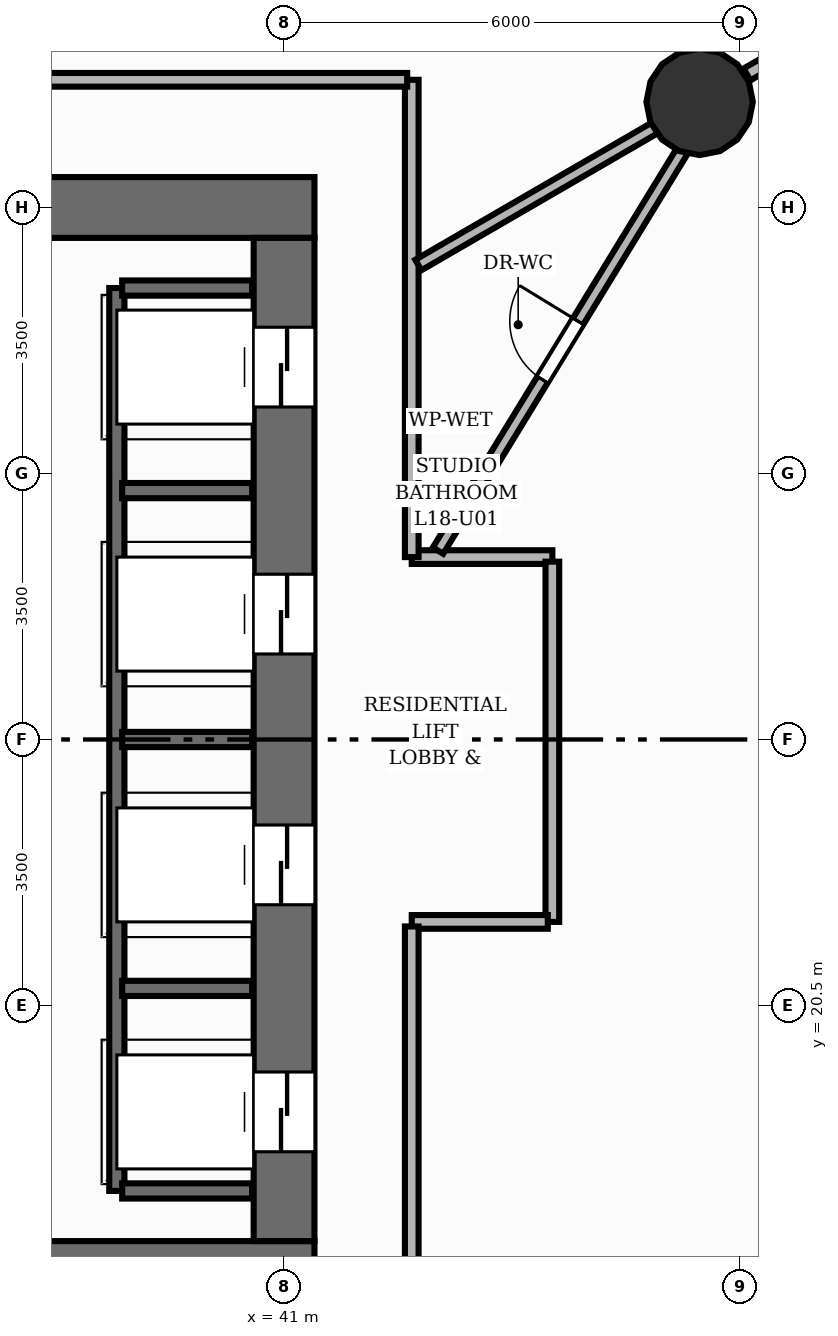
"""IFC4 building model, lengths in metres.
Left out: names, types, materials, properties, quantities, classifications, styles, units other than length and angle.
Written with IfcOpenShell. Run it as: python <this file> out.ifc"""

import sys

from ifc_helpers import new_model, si_unit, direction, frame, frame_2d, origin, origin_2d, place, context, subcontext, project, spatial, rectangle, circle, extrude, element, fill, save


model = new_model("IFC4")
c1 = context("Model", 3, precision=1e-05, world=origin(), true_north=direction((0.0, 1.0)))
c2 = subcontext(c1, "Body", "Model", "MODEL_VIEW")
j1 = project(units=[si_unit("LENGTHUNIT", "METRE"), si_unit("PLANEANGLEUNIT", "RADIAN")], contexts=[c1])
p1 = place(None, origin())
s1 = spatial("IfcSite", under=j1, at=p1, CompositionType="ELEMENT")
p2 = place(p1, origin())
s2 = spatial("IfcBuilding", under=s1, at=p2, CompositionType="ELEMENT")
p3 = place(p2, frame((0.0, 0.0, 63.2)))
s3 = spatial("IfcBuildingStorey", under=s2, at=p3, CompositionType="ELEMENT", Elevation=63.2)
p4 = place(p3, frame((22.6, 17.0, 0.0), z_axis=(0.0, 0.0, 1.0), x_axis=(1.0, 0.0, 0.0)))
e1 = element("IfcWall", 1, at=p4, inside=s3, PredefinedType="SHEAR", context=c2, shape_type="SweptSolid", body=[
    extrude(rectangle(XDim=18.8, YDim=0.8, at=frame_2d((9.4, 0.0))), origin(), (0.0, 0.0, 1.0), 3.2),
])
p5 = place(p4, frame((5.9, 0.0, 0.0)))
e2 = element("IfcOpeningElement", 2, at=p5, cuts=e1, PredefinedType="OPENING", context=c2, shape_type="SweptSolid", body=[
    extrude(rectangle(XDim=1.1, YDim=2.15, at=frame_2d((0.55, 1.075))), frame((0.0, 0.41, 0.0), z_axis=(0.0, -1.0, 0.0), x_axis=(1.0, 0.0, 0.0)), (0.0, 0.0, 1.0), 0.82),
])
p6 = place(p4, frame((9.45, 0.0, 0.0)))
e3 = element("IfcOpeningElement", 3, at=p6, cuts=e1, PredefinedType="OPENING", context=c2, shape_type="SweptSolid", body=[
    extrude(rectangle(XDim=0.9, YDim=2.0, at=frame_2d((0.45, 1.0))), frame((0.0, 0.41, 0.0), z_axis=(0.0, -1.0, 0.0), x_axis=(1.0, 0.0, 0.0)), (0.0, 0.0, 1.0), 0.82),
])
p7 = place(p3, frame((22.6, 31.0, 0.0), z_axis=(0.0, 0.0, 1.0), x_axis=(1.0, 0.0, 0.0)))
e4 = element("IfcWall", 4, at=p7, inside=s3, PredefinedType="SHEAR", context=c2, shape_type="SweptSolid", body=[
    extrude(rectangle(XDim=18.8, YDim=0.8, at=frame_2d((9.4, 0.0))), origin(), (0.0, 0.0, 1.0), 3.2),
])
p8 = place(p7, frame((11.8, 0.0, 0.0)))
e5 = element("IfcOpeningElement", 5, at=p8, cuts=e4, PredefinedType="OPENING", context=c2, shape_type="SweptSolid", body=[
    extrude(rectangle(XDim=1.1, YDim=2.15, at=frame_2d((0.55, 1.075))), frame((0.0, 0.41, 0.0), z_axis=(0.0, -1.0, 0.0), x_axis=(1.0, 0.0, 0.0)), (0.0, 0.0, 1.0), 0.82),
])
p9 = place(p3, frame((41.0, 17.4, 0.0), z_axis=(0.0, 0.0, 1.0), x_axis=(0.0, 1.0, 0.0)))
e6 = element("IfcWall", 6, at=p9, inside=s3, PredefinedType="SHEAR", context=c2, shape_type="SweptSolid", body=[
    extrude(rectangle(XDim=13.2, YDim=0.8, at=frame_2d((6.6, 0.0))), origin(), (0.0, 0.0, 1.0), 3.2),
])
p10 = place(p9, frame((1.175, 0.0, 0.0)))
e7 = element("IfcOpeningElement", 7, at=p10, cuts=e6, PredefinedType="OPENING", context=c2, shape_type="SweptSolid", body=[
    extrude(rectangle(XDim=1.05, YDim=2.0, at=frame_2d((0.525, 1.0))), frame((0.0, 0.41, 0.0), z_axis=(0.0, -1.0, 0.0), x_axis=(1.0, 0.0, 0.0)), (0.0, 0.0, 1.0), 0.82),
])
p11 = place(p9, frame((4.425, 0.0, 0.0)))
e8 = element("IfcOpeningElement", 8, at=p11, cuts=e6, PredefinedType="OPENING", context=c2, shape_type="SweptSolid", body=[
    extrude(rectangle(XDim=1.05, YDim=2.0, at=frame_2d((0.525, 1.0))), frame((0.0, 0.41, 0.0), z_axis=(0.0, -1.0, 0.0), x_axis=(1.0, 0.0, 0.0)), (0.0, 0.0, 1.0), 0.82),
])
p12 = place(p9, frame((7.725, 0.0, 0.0)))
e9 = element("IfcOpeningElement", 9, at=p12, cuts=e6, PredefinedType="OPENING", context=c2, shape_type="SweptSolid", body=[
    extrude(rectangle(XDim=1.05, YDim=2.0, at=frame_2d((0.525, 1.0))), frame((0.0, 0.41, 0.0), z_axis=(0.0, -1.0, 0.0), x_axis=(1.0, 0.0, 0.0)), (0.0, 0.0, 1.0), 0.82),
])
p13 = place(p9, frame((10.975, 0.0, 0.0)))
e10 = element("IfcOpeningElement", 10, at=p13, cuts=e6, PredefinedType="OPENING", context=c2, shape_type="SweptSolid", body=[
    extrude(rectangle(XDim=1.05, YDim=2.0, at=frame_2d((0.525, 1.0))), frame((0.0, 0.41, 0.0), z_axis=(0.0, -1.0, 0.0), x_axis=(1.0, 0.0, 0.0)), (0.0, 0.0, 1.0), 0.82),
])
p14 = place(p3, frame((46.468, 32.389, 0.0), z_axis=(0.0, 0.0, 1.0), x_axis=(1.0, 0.0, 0.0)))
e11 = element("IfcColumn", 11, at=p14, inside=s3, PredefinedType="COLUMN", context=c2, shape_type="SweptSolid", body=[
    extrude(circle(Radius=0.7, at=origin_2d()), origin(), (0.0, 0.0, 1.0), 3.2),
])
p15 = place(p3, frame((38.8, 18.06, 0.0), z_axis=(0.0, 0.0, 1.0), x_axis=(0.0, 1.0, 0.0)))
e12 = element("IfcWall", 12, at=p15, inside=s3, PredefinedType="SHEAR", context=c2, shape_type="SweptSolid", body=[
    extrude(rectangle(XDim=11.88, YDim=0.2, at=frame_2d((5.94, 0.0))), origin(), (0.0, 0.0, 1.0), 3.2),
])
for number, where, z_axis, x_axis in (
    (13, (38.87, 18.06, 0.0), (0.0, 0.0, 1.0), (1.0, 0.0, 0.0)),
    (14, (38.87, 29.94, 0.0), (0.0, 0.0, 1.0), (1.0, 0.0, 0.0)),
    (15, (38.87, 20.725, 0.0), (0.0, 0.0, 1.0), (1.0, 0.0, 0.0)),
    (16, (38.87, 24.0, 0.0), (0.0, 0.0, 1.0), (1.0, 0.0, 0.0)),
    (17, (38.87, 27.275, 0.0), (0.0, 0.0, 1.0), (1.0, 0.0, 0.0)),
):
    element("IfcWall", number, at=place(p3, frame(where, z_axis=z_axis, x_axis=x_axis)), inside=s3, PredefinedType="SHEAR", context=c2, shape_type="SweptSolid", body=[
        extrude(rectangle(XDim=1.71, YDim=0.2, at=frame_2d((0.855, 0.0))), origin(), (0.0, 0.0, 1.0), 3.2),
    ])
p16 = place(p3, frame((47.091, 32.75, 0.0), z_axis=(0.0, 0.0, 1.0), x_axis=(0.865028951922, 0.501721947234, 0.0)))
e18 = element("IfcWall", 18, at=p16, inside=s3, PredefinedType="PARTITIONING", context=c2, shape_type="SweptSolid", body=[
    extrude(rectangle(XDim=1.894, YDim=0.18, at=frame_2d((0.947, 0.0))), origin(), (0.0, 0.0, 1.0), 2.018),
])
p17 = place(p3, frame((42.68, 26.4, 0.0), z_axis=(0.0, 0.0, 1.0), x_axis=(1.0, 0.0, 0.0)))
e19 = element("IfcWall", 19, at=p17, inside=s3, PredefinedType="PARTITIONING", context=c2, shape_type="SweptSolid", body=[
    extrude(rectangle(XDim=1.85, YDim=0.18, at=frame_2d((0.925, 0.0))), origin(), (0.0, 0.0, 1.0), 2.018),
])
p18 = place(p3, frame((44.53, 26.34, 0.0), z_axis=(0.0, 0.0, 1.0), x_axis=(0.0, -1.0, 0.0)))
e20 = element("IfcWall", 20, at=p18, inside=s3, PredefinedType="PARTITIONING", context=c2, shape_type="SweptSolid", body=[
    extrude(rectangle(XDim=4.74, YDim=0.18, at=frame_2d((2.37, 0.0))), origin(), (0.0, 0.0, 1.0), 2.795),
])
p19 = place(p3, frame((44.47, 21.6, 0.0), z_axis=(0.0, 0.0, 1.0), x_axis=(-1.0, 0.0, 0.0)))
e21 = element("IfcWall", 21, at=p19, inside=s3, PredefinedType="PARTITIONING", context=c2, shape_type="SweptSolid", body=[
    extrude(rectangle(XDim=1.79, YDim=0.18, at=frame_2d((0.895, 0.0))), origin(), (0.0, 0.0, 1.0), 2.018),
])
p20 = place(p3, frame((42.68, 21.54, 0.0), z_axis=(0.0, 0.0, 1.0), x_axis=(0.0, -1.0, 0.0)))
e22 = element("IfcWall", 22, at=p20, inside=s3, PredefinedType="PARTITIONING", context=c2, shape_type="SweptSolid", body=[
    extrude(rectangle(XDim=6.22, YDim=0.18, at=frame_2d((3.11, 0.0))), origin(), (0.0, 0.0, 1.0), 2.795),
])
p21 = place(p3, frame((42.68, 32.68, 0.0), z_axis=(0.0, 0.0, 1.0), x_axis=(0.0, -1.0, 0.0)))
e23 = element("IfcWall", 23, at=p21, inside=s3, PredefinedType="PARTITIONING", context=c2, shape_type="SweptSolid", body=[
    extrude(rectangle(XDim=6.28, YDim=0.18, at=frame_2d((3.14, 0.0))), origin(), (0.0, 0.0, 1.0), 2.795),
])
p22 = place(p3, frame((21.32, 32.68, 0.0), z_axis=(0.0, 0.0, 1.0), x_axis=(1.0, 0.0, 0.0)))
e24 = element("IfcWall", 24, at=p22, inside=s3, PredefinedType="PARTITIONING", context=c2, shape_type="SweptSolid", body=[
    extrude(rectangle(XDim=21.3, YDim=0.18, at=frame_2d((10.65, 0.0))), origin(), (0.0, 0.0, 1.0), 2.795),
])
p23 = place(p22, frame((13.68, 0.0, 0.0)))
e25 = element("IfcOpeningElement", 25, at=p23, cuts=e24, PredefinedType="OPENING", context=c2, shape_type="SweptSolid", body=[
    extrude(rectangle(XDim=1.05, YDim=2.15, at=frame_2d((0.525, 1.075))), frame((0.0, 0.1, 0.0), z_axis=(0.0, -1.0, 0.0), x_axis=(1.0, 0.0, 0.0)), (0.0, 0.0, 1.0), 0.2),
])
p24 = place(p3, frame((43.026, 26.485, 0.0), z_axis=(0.0, 0.0, 1.0), x_axis=(0.521413206751, 0.853304323103, 0.0)))
e26 = element("IfcWall", 26, at=p24, inside=s3, PredefinedType="PLUMBINGWALL", context=c2, shape_type="SweptSolid", body=[
    extrude(rectangle(XDim=6.172, YDim=0.16, at=frame_2d((3.086, 0.0))), origin(), (0.0, 0.0, 1.0), 2.795),
])
p25 = place(p24, frame((2.636, 0.0, 0.0)))
e27 = element("IfcOpeningElement", 27, at=p25, cuts=e26, PredefinedType="OPENING", context=c2, shape_type="SweptSolid", body=[
    extrude(rectangle(XDim=0.9, YDim=2.1, at=frame_2d((0.45, 1.05))), frame((0.0, 0.09, 0.0), z_axis=(0.0, -1.0, 0.0), x_axis=(1.0, 0.0, 0.0)), (0.0, 0.0, 1.0), 0.18),
])
p26 = place(p3, frame((42.767, 30.243, 0.0), z_axis=(0.0, 0.0, 1.0), x_axis=(0.865055926686, 0.501675436617, 0.0)))
e28 = element("IfcWall", 28, at=p26, inside=s3, PredefinedType="PLUMBINGWALL", context=c2, shape_type="SweptSolid", body=[
    extrude(rectangle(XDim=3.598, YDim=0.16, at=frame_2d((1.799, 0.0))), origin(), (0.0, 0.0, 1.0), 2.018),
])
p27 = place(p10, origin())
e29 = element("IfcDoor", 29, at=p27, inside=s3, OperationType="DOUBLE_DOOR_SLIDING", PredefinedType="DOOR", context=c2, shape_type="SweptSolid", body=[
    extrude(rectangle(XDim=1.05, YDim=2.0, at=frame_2d((0.525, 1.0))), frame((0.0, 0.025, 0.0), z_axis=(0.0, -1.0, 0.0), x_axis=(1.0, 0.0, 0.0)), (0.0, 0.0, 1.0), 0.05),
])
fill(e7, e29)
p28 = place(p11, origin())
e30 = element("IfcDoor", 30, at=p28, inside=s3, OperationType="DOUBLE_DOOR_SLIDING", PredefinedType="DOOR", context=c2, shape_type="SweptSolid", body=[
    extrude(rectangle(XDim=1.05, YDim=2.0, at=frame_2d((0.525, 1.0))), frame((0.0, 0.025, 0.0), z_axis=(0.0, -1.0, 0.0), x_axis=(1.0, 0.0, 0.0)), (0.0, 0.0, 1.0), 0.05),
])
fill(e8, e30)
p29 = place(p12, origin())
e31 = element("IfcDoor", 31, at=p29, inside=s3, OperationType="DOUBLE_DOOR_SLIDING", PredefinedType="DOOR", context=c2, shape_type="SweptSolid", body=[
    extrude(rectangle(XDim=1.05, YDim=2.0, at=frame_2d((0.525, 1.0))), frame((0.0, 0.025, 0.0), z_axis=(0.0, -1.0, 0.0), x_axis=(1.0, 0.0, 0.0)), (0.0, 0.0, 1.0), 0.05),
])
fill(e9, e31)
p30 = place(p13, origin())
e32 = element("IfcDoor", 32, at=p30, inside=s3, OperationType="DOUBLE_DOOR_SLIDING", PredefinedType="DOOR", context=c2, shape_type="SweptSolid", body=[
    extrude(rectangle(XDim=1.05, YDim=2.0, at=frame_2d((0.525, 1.0))), frame((0.0, 0.025, 0.0), z_axis=(0.0, -1.0, 0.0), x_axis=(1.0, 0.0, 0.0)), (0.0, 0.0, 1.0), 0.05),
])
fill(e10, e32)
p31 = place(p25, origin())
e33 = element("IfcDoor", 33, at=p31, inside=s3, OperationType="SINGLE_SWING_RIGHT", PredefinedType="DOOR", context=c2, shape_type="SweptSolid", body=[
    extrude(rectangle(XDim=0.9, YDim=2.1, at=frame_2d((0.45, 1.05))), frame((0.0, 0.025, 0.0), z_axis=(0.0, -1.0, 0.0), x_axis=(1.0, 0.0, 0.0)), (0.0, 0.0, 1.0), 0.05),
])
fill(e27, e33)
save(model, sys.argv[1])
